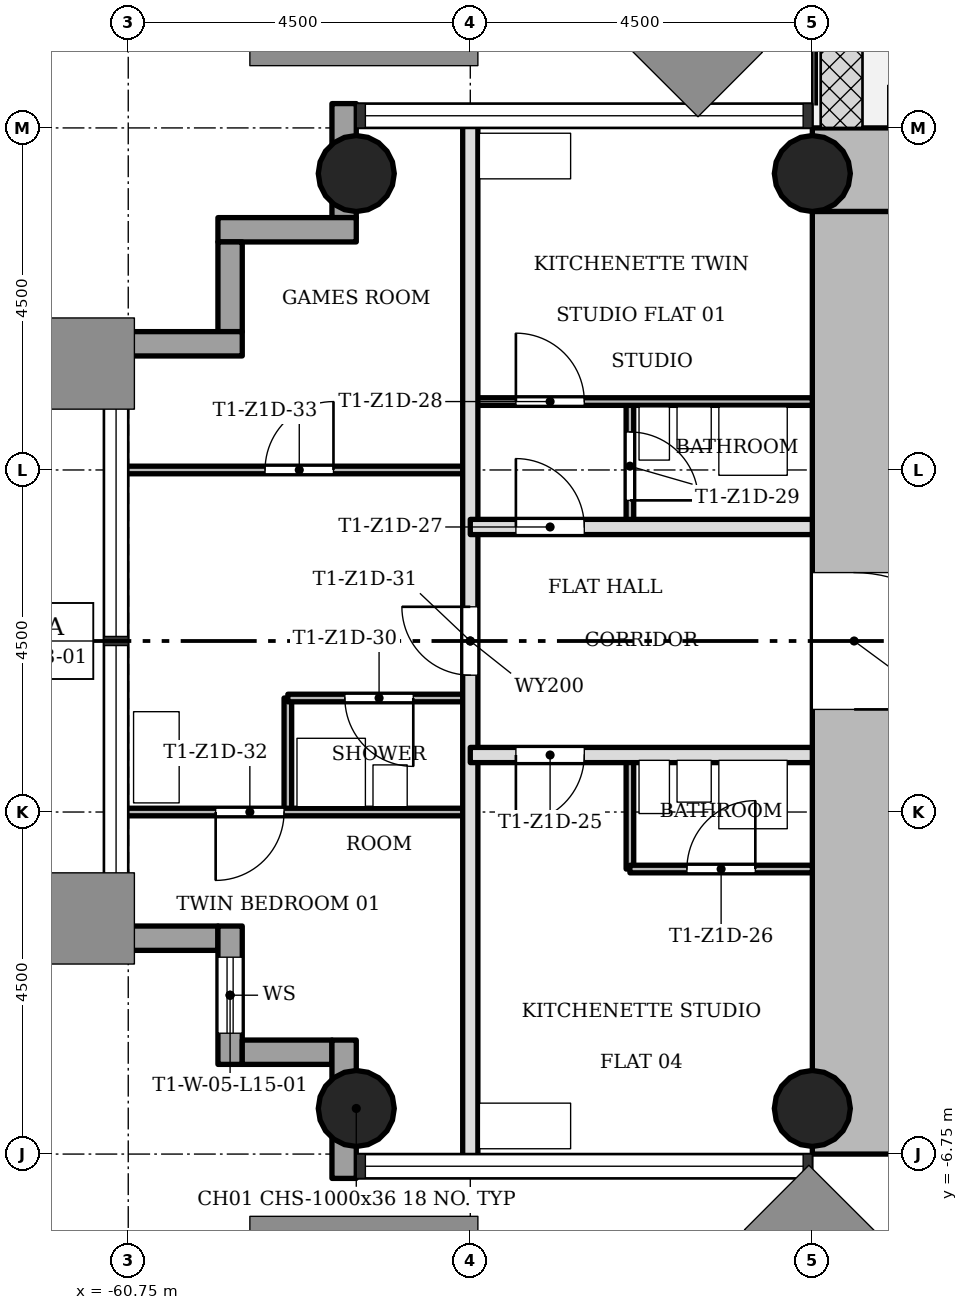
"""IFC4 building model, lengths in metres.
Left out: names, types, materials, properties, quantities, classifications, styles, units other than length and angle.
Written with IfcOpenShell. Run it as: python <this file> out.ifc"""

import sys

from ifc_helpers import new_model, si_unit, direction, frame, frame_2d, origin, origin_2d, place, context, subcontext, project, spatial, rectangle, hollow_circle, extrude, element, fill, save


model = new_model("IFC4")
c1 = context("Model", 3, precision=1e-05, world=origin(), true_north=direction((0.0, 1.0)))
c2 = subcontext(c1, "Body", "Model", "MODEL_VIEW")
j1 = project(units=[si_unit("LENGTHUNIT", "METRE"), si_unit("PLANEANGLEUNIT", "RADIAN")], contexts=[c1])
p1 = place(None, origin())
s1 = spatial("IfcSite", under=j1, at=p1, CompositionType="ELEMENT")
p2 = place(p1, origin())
s2 = spatial("IfcBuilding", under=s1, at=p2, CompositionType="ELEMENT")
p3 = place(p2, frame((0.0, 0.0, 58.5)))
s3 = spatial("IfcBuildingStorey", under=s2, at=p3, CompositionType="ELEMENT", Elevation=58.5)
p4 = place(p3, frame((-43.85, 6.2, 0.0), z_axis=(0.0, 0.0, 1.0), x_axis=(-1.0, 0.0, 0.0)))
e1 = element("IfcWall", 1, at=p4, inside=s3, PredefinedType="SHEAR", context=c2, shape_type="SweptSolid", body=[
    extrude(rectangle(XDim=7.9, YDim=1.1, at=frame_2d((3.95, 0.0))), origin(), (0.0, 0.0, 1.0), 3.4),
])
p5 = place(p3, frame((-51.2, 5.65, 0.0), z_axis=(0.0, 0.0, 1.0), x_axis=(0.0, -1.0, 0.0)))
e2 = element("IfcWall", 2, at=p5, inside=s3, PredefinedType="SHEAR", context=c2, shape_type="SweptSolid", body=[
    extrude(rectangle(XDim=12.4, YDim=1.1, at=frame_2d((6.2, 0.0))), origin(), (0.0, 0.0, 1.0), 3.4),
])
p6 = place(p5, frame((4.75, 0.0, 0.0)))
e3 = element("IfcOpeningElement", 3, at=p6, cuts=e2, PredefinedType="OPENING", context=c2, shape_type="SweptSolid", body=[
    extrude(rectangle(XDim=1.8, YDim=2.1, at=frame_2d((0.9, 1.05))), frame((0.0, 0.56, 0.0), z_axis=(0.0, -1.0, 0.0), x_axis=(1.0, 0.0, 0.0)), (0.0, 0.0, 1.0), 1.12),
])
for number, where, z_axis, x_axis in (
    (4, (-51.75, -6.15, 0.0), (0.0, 0.0, 1.0), (1.0, 0.0, 0.0)),
    (5, (-51.75, 6.15, 0.0), (0.0, 0.0, 1.0), (1.0, 0.0, 0.0)),
    (6, (-57.75, -6.15, 0.0), (0.0, 0.0, 1.0), (1.0, 0.0, 0.0)),
    (7, (-57.75, 6.15, 0.0), (0.0, 0.0, 1.0), (1.0, 0.0, 0.0)),
):
    element("IfcColumn", number, at=place(p3, frame(where, z_axis=z_axis, x_axis=x_axis)), inside=s3, PredefinedType="COLUMN", context=c2, shape_type="SweptSolid", body=[
        extrude(hollow_circle(Radius=0.5, WallThickness=0.036, at=origin_2d()), origin(), (0.0, 0.0, 1.0), 3.4),
    ])
p7 = place(p3, frame((-61.07, -3.91, -0.3), z_axis=(0.0, 0.0, 1.0), x_axis=(1.0, 0.0, 0.0)))
e8 = element("IfcWall", 8, at=p7, inside=s3, PredefinedType="STANDARD", context=c2, shape_type="SweptSolid", body=[
    extrude(rectangle(XDim=1.5, YDim=0.32, at=frame_2d((0.75, 0.0))), origin(), (0.0, 0.0, 1.0), 3.4),
])
p8 = place(p3, frame((-59.41, -3.75, -0.3), z_axis=(0.0, 0.0, 1.0), x_axis=(0.0, -1.0, 0.0)))
e9 = element("IfcWall", 9, at=p8, inside=s3, PredefinedType="STANDARD", context=c2, shape_type="SweptSolid", body=[
    extrude(rectangle(XDim=1.82, YDim=0.32, at=frame_2d((0.91, 0.0))), origin(), (0.0, 0.0, 1.0), 3.4),
])
p9 = place(p8, frame((0.41, 0.0, 1.2)))
e10 = element("IfcOpeningElement", 10, at=p9, cuts=e9, PredefinedType="OPENING", context=c2, shape_type="SweptSolid", body=[
    extrude(rectangle(XDim=1.0, YDim=1.5, at=frame_2d((0.5, 0.75))), frame((0.0, 0.17, 0.0), z_axis=(0.0, -1.0, 0.0), x_axis=(1.0, 0.0, 0.0)), (0.0, 0.0, 1.0), 0.34),
])
p10 = place(p3, frame((-59.25, -5.41, -0.3), z_axis=(0.0, 0.0, 1.0), x_axis=(1.0, 0.0, 0.0)))
e11 = element("IfcWall", 11, at=p10, inside=s3, PredefinedType="STANDARD", context=c2, shape_type="SweptSolid", body=[
    extrude(rectangle(XDim=1.18, YDim=0.32, at=frame_2d((0.59, 0.0))), origin(), (0.0, 0.0, 1.0), 3.4),
])
p11 = place(p3, frame((-57.91, -5.25, -0.3), z_axis=(0.0, 0.0, 1.0), x_axis=(0.0, -1.0, 0.0)))
e12 = element("IfcWall", 12, at=p11, inside=s3, PredefinedType="STANDARD", context=c2, shape_type="SweptSolid", body=[
    extrude(rectangle(XDim=1.82, YDim=0.32, at=frame_2d((0.91, 0.0))), origin(), (0.0, 0.0, 1.0), 3.4),
])
p12 = place(p3, frame((-57.91, 7.07, -0.3), z_axis=(0.0, 0.0, 1.0), x_axis=(0.0, -1.0, 0.0)))
e13 = element("IfcWall", 13, at=p12, inside=s3, PredefinedType="STANDARD", context=c2, shape_type="SweptSolid", body=[
    extrude(rectangle(XDim=1.5, YDim=0.32, at=frame_2d((0.75, 0.0))), origin(), (0.0, 0.0, 1.0), 3.4),
])
p13 = place(p3, frame((-57.75, 5.41, -0.3), z_axis=(0.0, 0.0, 1.0), x_axis=(-1.0, 0.0, 0.0)))
e14 = element("IfcWall", 14, at=p13, inside=s3, PredefinedType="STANDARD", context=c2, shape_type="SweptSolid", body=[
    extrude(rectangle(XDim=1.82, YDim=0.32, at=frame_2d((0.91, 0.0))), origin(), (0.0, 0.0, 1.0), 3.4),
])
p14 = place(p3, frame((-59.41, 5.25, -0.3), z_axis=(0.0, 0.0, 1.0), x_axis=(0.0, -1.0, 0.0)))
e15 = element("IfcWall", 15, at=p14, inside=s3, PredefinedType="STANDARD", context=c2, shape_type="SweptSolid", body=[
    extrude(rectangle(XDim=1.18, YDim=0.32, at=frame_2d((0.59, 0.0))), origin(), (0.0, 0.0, 1.0), 3.4),
])
p15 = place(p3, frame((-59.25, 3.91, -0.3), z_axis=(0.0, 0.0, 1.0), x_axis=(-1.0, 0.0, 0.0)))
e16 = element("IfcWall", 16, at=p15, inside=s3, PredefinedType="STANDARD", context=c2, shape_type="SweptSolid", body=[
    extrude(rectangle(XDim=1.82, YDim=0.32, at=frame_2d((0.91, 0.0))), origin(), (0.0, 0.0, 1.0), 3.4),
])
p16 = place(p3, frame((-58.65, -2.25, 0.0), z_axis=(0.0, 0.0, 1.0), x_axis=(0.0, 1.0, 0.0)))
e17 = element("IfcWall", 17, at=p16, inside=s3, PredefinedType="PARTITIONING", context=c2, shape_type="SweptSolid", body=[
    extrude(rectangle(XDim=1.5, YDim=0.1, at=frame_2d((0.75, 0.0))), origin(), (0.0, 0.0, 1.0), 3.0),
])
p17 = place(p3, frame((-56.25, -6.85, 0.0), z_axis=(0.0, 0.0, 1.0), x_axis=(0.0, 1.0, 0.0)))
e18 = element("IfcWall", 18, at=p17, inside=s3, PredefinedType="SOLIDWALL", context=c2, shape_type="SweptSolid", body=[
    extrude(rectangle(XDim=13.7, YDim=0.2, at=frame_2d((6.85, 0.0))), origin(), (0.0, 0.0, 1.0), 3.0),
])
p18 = place(p17, frame((6.4, 0.0, 0.0)))
e19 = element("IfcOpeningElement", 19, at=p18, cuts=e18, PredefinedType="OPENING", context=c2, shape_type="SweptSolid", body=[
    extrude(rectangle(XDim=0.9, YDim=2.1, at=frame_2d((0.45, 1.05))), frame((0.0, 0.11, 0.0), z_axis=(0.0, -1.0, 0.0), x_axis=(1.0, 0.0, 0.0)), (0.0, 0.0, 1.0), 0.22),
])
p19 = place(p3, frame((-54.15, -3.0, 0.0), z_axis=(0.0, 0.0, 1.0), x_axis=(0.0, 1.0, 0.0)))
e20 = element("IfcWall", 20, at=p19, inside=s3, PredefinedType="PARTITIONING", context=c2, shape_type="SweptSolid", body=[
    extrude(rectangle(XDim=1.5, YDim=0.1, at=frame_2d((0.75, 0.0))), origin(), (0.0, 0.0, 1.0), 3.0),
])
p20 = place(p3, frame((-54.15, 1.5, 0.0), z_axis=(0.0, 0.0, 1.0), x_axis=(0.0, 1.0, 0.0)))
e21 = element("IfcWall", 21, at=p20, inside=s3, PredefinedType="PARTITIONING", context=c2, shape_type="SweptSolid", body=[
    extrude(rectangle(XDim=1.65, YDim=0.1, at=frame_2d((0.825, 0.0))), origin(), (0.0, 0.0, 1.0), 3.0),
])
p21 = place(p20, frame((0.35, 0.0, 0.0)))
e22 = element("IfcOpeningElement", 22, at=p21, cuts=e21, PredefinedType="OPENING", context=c2, shape_type="SweptSolid", body=[
    extrude(rectangle(XDim=0.9, YDim=2.1, at=frame_2d((0.45, 1.05))), frame((0.0, 0.06, 0.0), z_axis=(0.0, -1.0, 0.0), x_axis=(1.0, 0.0, 0.0)), (0.0, 0.0, 1.0), 0.12),
])
p22 = place(p3, frame((-54.15, -3.0, 0.0), z_axis=(0.0, 0.0, 1.0), x_axis=(1.0, 0.0, 0.0)))
e23 = element("IfcWall", 23, at=p22, inside=s3, PredefinedType="PARTITIONING", context=c2, shape_type="SweptSolid", body=[
    extrude(rectangle(XDim=2.4, YDim=0.1, at=frame_2d((1.2, 0.0))), origin(), (0.0, 0.0, 1.0), 3.0),
])
p23 = place(p22, frame((0.75, 0.0, 0.0)))
e24 = element("IfcOpeningElement", 24, at=p23, cuts=e23, PredefinedType="OPENING", context=c2, shape_type="SweptSolid", body=[
    extrude(rectangle(XDim=0.9, YDim=2.1, at=frame_2d((0.45, 1.05))), frame((0.0, 0.06, 0.0), z_axis=(0.0, -1.0, 0.0), x_axis=(1.0, 0.0, 0.0)), (0.0, 0.0, 1.0), 0.12),
])
p24 = place(p3, frame((-60.85, -2.25, 0.0), z_axis=(0.0, 0.0, 1.0), x_axis=(1.0, 0.0, 0.0)))
e25 = element("IfcWall", 25, at=p24, inside=s3, PredefinedType="PARTITIONING", context=c2, shape_type="SweptSolid", body=[
    extrude(rectangle(XDim=4.6, YDim=0.1, at=frame_2d((2.3, 0.0))), origin(), (0.0, 0.0, 1.0), 3.0),
])
p25 = place(p24, frame((1.25, 0.0, 0.0)))
e26 = element("IfcOpeningElement", 26, at=p25, cuts=e25, PredefinedType="OPENING", context=c2, shape_type="SweptSolid", body=[
    extrude(rectangle(XDim=0.9, YDim=2.1, at=frame_2d((0.45, 1.05))), frame((0.0, 0.06, 0.0), z_axis=(0.0, -1.0, 0.0), x_axis=(1.0, 0.0, 0.0)), (0.0, 0.0, 1.0), 0.12),
])
p26 = place(p3, frame((-56.25, -1.5, 0.0), z_axis=(0.0, 0.0, 1.0), x_axis=(1.0, 0.0, 0.0)))
e27 = element("IfcWall", 27, at=p26, inside=s3, PredefinedType="SOLIDWALL", context=c2, shape_type="SweptSolid", body=[
    extrude(rectangle(XDim=4.5, YDim=0.2, at=frame_2d((2.25, 0.0))), origin(), (0.0, 0.0, 1.0), 3.0),
])
p27 = place(p26, frame((0.6, 0.0, 0.0)))
e28 = element("IfcOpeningElement", 28, at=p27, cuts=e27, PredefinedType="OPENING", context=c2, shape_type="SweptSolid", body=[
    extrude(rectangle(XDim=0.9, YDim=2.1, at=frame_2d((0.45, 1.05))), frame((0.0, 0.11, 0.0), z_axis=(0.0, -1.0, 0.0), x_axis=(1.0, 0.0, 0.0)), (0.0, 0.0, 1.0), 0.22),
])
p28 = place(p3, frame((-58.65, -0.75, 0.0), z_axis=(0.0, 0.0, 1.0), x_axis=(1.0, 0.0, 0.0)))
e29 = element("IfcWall", 29, at=p28, inside=s3, PredefinedType="PARTITIONING", context=c2, shape_type="SweptSolid", body=[
    extrude(rectangle(XDim=2.4, YDim=0.1, at=frame_2d((1.2, 0.0))), origin(), (0.0, 0.0, 1.0), 3.0),
])
p29 = place(p28, frame((0.75, 0.0, 0.0)))
e30 = element("IfcOpeningElement", 30, at=p29, cuts=e29, PredefinedType="OPENING", context=c2, shape_type="SweptSolid", body=[
    extrude(rectangle(XDim=0.9, YDim=2.1, at=frame_2d((0.45, 1.05))), frame((0.0, 0.06, 0.0), z_axis=(0.0, -1.0, 0.0), x_axis=(1.0, 0.0, 0.0)), (0.0, 0.0, 1.0), 0.12),
])
p30 = place(p3, frame((-56.25, 1.5, 0.0), z_axis=(0.0, 0.0, 1.0), x_axis=(1.0, 0.0, 0.0)))
e31 = element("IfcWall", 31, at=p30, inside=s3, PredefinedType="SOLIDWALL", context=c2, shape_type="SweptSolid", body=[
    extrude(rectangle(XDim=4.5, YDim=0.2, at=frame_2d((2.25, 0.0))), origin(), (0.0, 0.0, 1.0), 3.0),
])
p31 = place(p30, frame((0.6, 0.0, 0.0)))
e32 = element("IfcOpeningElement", 32, at=p31, cuts=e31, PredefinedType="OPENING", context=c2, shape_type="SweptSolid", body=[
    extrude(rectangle(XDim=0.9, YDim=2.1, at=frame_2d((0.45, 1.05))), frame((0.0, 0.11, 0.0), z_axis=(0.0, -1.0, 0.0), x_axis=(1.0, 0.0, 0.0)), (0.0, 0.0, 1.0), 0.22),
])
p32 = place(p3, frame((-60.85, 2.25, 0.0), z_axis=(0.0, 0.0, 1.0), x_axis=(1.0, 0.0, 0.0)))
e33 = element("IfcWall", 33, at=p32, inside=s3, PredefinedType="PARTITIONING", context=c2, shape_type="SweptSolid", body=[
    extrude(rectangle(XDim=4.6, YDim=0.1, at=frame_2d((2.3, 0.0))), origin(), (0.0, 0.0, 1.0), 3.0),
])
p33 = place(p32, frame((1.9, 0.0, 0.0)))
e34 = element("IfcOpeningElement", 34, at=p33, cuts=e33, PredefinedType="OPENING", context=c2, shape_type="SweptSolid", body=[
    extrude(rectangle(XDim=0.9, YDim=2.1, at=frame_2d((0.45, 1.05))), frame((0.0, 0.06, 0.0), z_axis=(0.0, -1.0, 0.0), x_axis=(1.0, 0.0, 0.0)), (0.0, 0.0, 1.0), 0.12),
])
p34 = place(p3, frame((-56.25, 3.15, 0.0), z_axis=(0.0, 0.0, 1.0), x_axis=(1.0, 0.0, 0.0)))
e35 = element("IfcWall", 35, at=p34, inside=s3, PredefinedType="PARTITIONING", context=c2, shape_type="SweptSolid", body=[
    extrude(rectangle(XDim=4.5, YDim=0.1, at=frame_2d((2.25, 0.0))), origin(), (0.0, 0.0, 1.0), 3.0),
])
p35 = place(p34, frame((0.6, 0.0, 0.0)))
e36 = element("IfcOpeningElement", 36, at=p35, cuts=e35, PredefinedType="OPENING", context=c2, shape_type="SweptSolid", body=[
    extrude(rectangle(XDim=0.9, YDim=2.1, at=frame_2d((0.45, 1.05))), frame((0.0, 0.06, 0.0), z_axis=(0.0, -1.0, 0.0), x_axis=(1.0, 0.0, 0.0)), (0.0, 0.0, 1.0), 0.12),
])
p36 = place(p27, origin())
e37 = element("IfcDoor", 37, at=p36, inside=s3, OperationType="SINGLE_SWING_LEFT", PredefinedType="DOOR", context=c2, shape_type="SweptSolid", body=[
    extrude(rectangle(XDim=0.9, YDim=2.1, at=frame_2d((0.45, 1.05))), frame((0.0, 0.025, 0.0), z_axis=(0.0, -1.0, 0.0), x_axis=(1.0, 0.0, 0.0)), (0.0, 0.0, 1.0), 0.05),
])
fill(e28, e37)
p37 = place(p23, origin())
e38 = element("IfcDoor", 38, at=p37, inside=s3, OperationType="SINGLE_SWING_LEFT", PredefinedType="DOOR", context=c2, shape_type="SweptSolid", body=[
    extrude(rectangle(XDim=0.9, YDim=2.1, at=frame_2d((0.45, 1.05))), frame((0.0, 0.025, 0.0), z_axis=(0.0, -1.0, 0.0), x_axis=(1.0, 0.0, 0.0)), (0.0, 0.0, 1.0), 0.05),
])
fill(e24, e38)
p38 = place(p31, origin())
e39 = element("IfcDoor", 39, at=p38, inside=s3, OperationType="SINGLE_SWING_RIGHT", PredefinedType="DOOR", context=c2, shape_type="SweptSolid", body=[
    extrude(rectangle(XDim=0.9, YDim=2.1, at=frame_2d((0.45, 1.05))), frame((0.0, 0.025, 0.0), z_axis=(0.0, -1.0, 0.0), x_axis=(1.0, 0.0, 0.0)), (0.0, 0.0, 1.0), 0.05),
])
fill(e32, e39)
p39 = place(p35, origin())
e40 = element("IfcDoor", 40, at=p39, inside=s3, OperationType="SINGLE_SWING_RIGHT", PredefinedType="DOOR", context=c2, shape_type="SweptSolid", body=[
    extrude(rectangle(XDim=0.9, YDim=2.1, at=frame_2d((0.45, 1.05))), frame((0.0, 0.025, 0.0), z_axis=(0.0, -1.0, 0.0), x_axis=(1.0, 0.0, 0.0)), (0.0, 0.0, 1.0), 0.05),
])
fill(e36, e40)
p40 = place(p21, origin())
e41 = element("IfcDoor", 41, at=p40, inside=s3, OperationType="SINGLE_SWING_LEFT", PredefinedType="DOOR", context=c2, shape_type="SweptSolid", body=[
    extrude(rectangle(XDim=0.9, YDim=2.1, at=frame_2d((0.45, 1.05))), frame((0.0, 0.025, 0.0), z_axis=(0.0, -1.0, 0.0), x_axis=(1.0, 0.0, 0.0)), (0.0, 0.0, 1.0), 0.05),
])
fill(e22, e41)
p41 = place(p29, origin())
e42 = element("IfcDoor", 42, at=p41, inside=s3, OperationType="SINGLE_SWING_RIGHT", PredefinedType="DOOR", context=c2, shape_type="SweptSolid", body=[
    extrude(rectangle(XDim=0.9, YDim=2.1, at=frame_2d((0.45, 1.05))), frame((0.0, 0.025, 0.0), z_axis=(0.0, -1.0, 0.0), x_axis=(1.0, 0.0, 0.0)), (0.0, 0.0, 1.0), 0.05),
])
fill(e30, e42)
p42 = place(p18, origin())
e43 = element("IfcDoor", 43, at=p42, inside=s3, OperationType="SINGLE_SWING_LEFT", PredefinedType="DOOR", context=c2, shape_type="SweptSolid", body=[
    extrude(rectangle(XDim=0.9, YDim=2.1, at=frame_2d((0.45, 1.05))), frame((0.0, 0.025, 0.0), z_axis=(0.0, -1.0, 0.0), x_axis=(1.0, 0.0, 0.0)), (0.0, 0.0, 1.0), 0.05),
])
fill(e19, e43)
p43 = place(p25, origin())
e44 = element("IfcDoor", 44, at=p43, inside=s3, OperationType="SINGLE_SWING_LEFT", PredefinedType="DOOR", context=c2, shape_type="SweptSolid", body=[
    extrude(rectangle(XDim=0.9, YDim=2.1, at=frame_2d((0.45, 1.05))), frame((0.0, 0.025, 0.0), z_axis=(0.0, -1.0, 0.0), x_axis=(1.0, 0.0, 0.0)), (0.0, 0.0, 1.0), 0.05),
])
fill(e26, e44)
p44 = place(p33, origin())
e45 = element("IfcDoor", 45, at=p44, inside=s3, OperationType="SINGLE_SWING_LEFT", PredefinedType="DOOR", context=c2, shape_type="SweptSolid", body=[
    extrude(rectangle(XDim=0.9, YDim=2.1, at=frame_2d((0.45, 1.05))), frame((0.0, 0.025, 0.0), z_axis=(0.0, -1.0, 0.0), x_axis=(1.0, 0.0, 0.0)), (0.0, 0.0, 1.0), 0.05),
])
fill(e34, e45)
p45 = place(p6, origin())
e46 = element("IfcDoor", 46, at=p45, inside=s3, OperationType="SINGLE_SWING_LEFT", PredefinedType="DOOR", context=c2, shape_type="SweptSolid", body=[
    extrude(rectangle(XDim=1.8, YDim=2.1, at=frame_2d((0.9, 1.05))), frame((0.0, 0.025, 0.0), z_axis=(0.0, -1.0, 0.0), x_axis=(1.0, 0.0, 0.0)), (0.0, 0.0, 1.0), 0.05),
])
fill(e3, e46)
p46 = place(p9, origin())
e47 = element("IfcWindow", 47, at=p46, inside=s3, PartitioningType="SINGLE_PANEL", PredefinedType="WINDOW", context=c2, shape_type="SweptSolid", body=[
    extrude(rectangle(XDim=1.0, YDim=1.5, at=frame_2d((0.5, 0.75))), frame((0.0, 0.03, 0.0), z_axis=(0.0, -1.0, 0.0), x_axis=(1.0, 0.0, 0.0)), (0.0, 0.0, 1.0), 0.06),
])
fill(e10, e47)
save(model, sys.argv[1])
